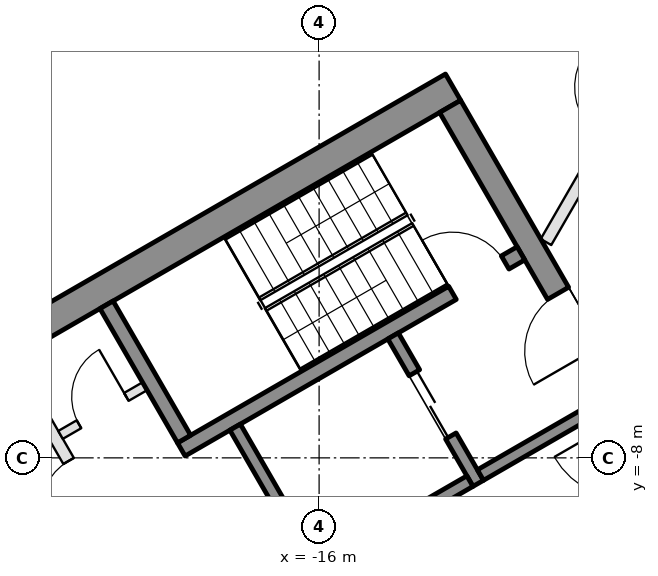
"""IFC4 building model, lengths in metres.
Left out: names, types, materials, properties, quantities, classifications, styles, units other than length and angle.
Written with IfcOpenShell. Run it as: python <this file> out.ifc"""

import sys

from ifc_helpers import new_model, si_unit, direction, frame, frame_2d, origin, place, context, subcontext, project, spatial, rectangle, extrude, element, fill, save


model = new_model("IFC4")
c1 = context("Model", 3, precision=1e-05, world=origin(), true_north=direction((0.0, 1.0)))
c2 = subcontext(c1, "Body", "Model", "MODEL_VIEW")
j1 = project(units=[si_unit("LENGTHUNIT", "METRE"), si_unit("PLANEANGLEUNIT", "RADIAN")], contexts=[c1])
p1 = place(None, origin())
s1 = spatial("IfcSite", under=j1, at=p1, CompositionType="ELEMENT")
p2 = place(p1, origin())
s2 = spatial("IfcBuilding", under=s1, at=p2, CompositionType="ELEMENT")
p3 = place(p2, frame((0.0, 0.0, 53.9)))
s3 = spatial("IfcBuildingStorey", under=s2, at=p3, CompositionType="ELEMENT", Elevation=53.9)
p4 = place(p3, frame((-20.309, 1.934, 0.0), z_axis=(0.0, 0.0, 1.0), x_axis=(-0.499992114976, -0.866029956157, 0.0)))
e1 = element("IfcWall", 1, at=p4, inside=s3, PredefinedType="SOLIDWALL", context=c2, shape_type="SweptSolid", body=[
    extrude(rectangle(XDim=6.74, YDim=0.35, at=frame_2d((3.37, 0.0))), origin(), (0.0, 0.0, 1.0), 3.55),
])
p5 = place(p4, frame((4.02, 0.0, 0.0)))
e2 = element("IfcOpeningElement", 2, at=p5, cuts=e1, PredefinedType="OPENING", context=c2, shape_type="SweptSolid", body=[
    extrude(rectangle(XDim=2.4, YDim=2.4, at=frame_2d((1.2, 1.2))), frame((0.0, 0.185, 0.0), z_axis=(0.0, -1.0, 0.0), x_axis=(1.0, 0.0, 0.0)), (0.0, 0.0, 1.0), 0.37),
])
p6 = place(p4, frame((0.32, 0.0, 0.3)))
e3 = element("IfcOpeningElement", 3, at=p6, cuts=e1, PredefinedType="OPENING", context=c2, shape_type="SweptSolid", body=[
    extrude(rectangle(XDim=1.5, YDim=2.65, at=frame_2d((0.75, 1.325))), frame((0.0, 0.185, 0.0), z_axis=(0.0, -1.0, 0.0), x_axis=(1.0, 0.0, 0.0)), (0.0, 0.0, 1.0), 0.37),
])
p7 = place(p4, frame((2.12, 0.0, 0.3)))
e4 = element("IfcOpeningElement", 4, at=p7, cuts=e1, PredefinedType="OPENING", context=c2, shape_type="SweptSolid", body=[
    extrude(rectangle(XDim=1.5, YDim=2.65, at=frame_2d((0.75, 1.325))), frame((0.0, 0.185, 0.0), z_axis=(0.0, -1.0, 0.0), x_axis=(1.0, 0.0, 0.0)), (0.0, 0.0, 1.0), 0.37),
])
p8 = place(p3, frame((-13.797, -1.903, 0.0), z_axis=(0.0, 0.0, 1.0), x_axis=(-0.866025009528, -0.500000682871, 0.0)))
e5 = element("IfcWall", 5, at=p8, inside=s3, PredefinedType="SHEAR", context=c2, shape_type="SweptSolid", body=[
    extrude(rectangle(XDim=14.837, YDim=0.5, at=frame_2d((7.418, 0.0))), origin(), (0.0, 0.0, 1.0), 3.5),
])
p9 = place(p3, frame((-13.845, -2.22, 0.0), z_axis=(0.0, 0.0, 1.0), x_axis=(0.500004234368, -0.866022959057, 0.0)))
e6 = element("IfcWall", 6, at=p9, inside=s3, PredefinedType="SHEAR", context=c2, shape_type="SweptSolid", body=[
    extrude(rectangle(XDim=10.0, YDim=0.4, at=frame_2d((5.0, 0.0))), origin(), (0.0, 0.0, 1.0), 3.5),
])
p10 = place(p9, frame((3.55, 0.0, 0.0)))
e7 = element("IfcOpeningElement", 7, at=p10, cuts=e6, PredefinedType="OPENING", context=c2, shape_type="SweptSolid", body=[
    extrude(rectangle(XDim=1.1, YDim=2.1, at=frame_2d((0.55, 1.05))), frame((0.0, 0.21, 0.0), z_axis=(0.0, -1.0, 0.0), x_axis=(1.0, 0.0, 0.0)), (0.0, 0.0, 1.0), 0.42),
])
p11 = place(p9, frame((5.85, 0.0, 0.0)))
e8 = element("IfcOpeningElement", 8, at=p11, cuts=e6, PredefinedType="OPENING", context=c2, shape_type="SweptSolid", body=[
    extrude(rectangle(XDim=1.4, YDim=2.1, at=frame_2d((0.7, 1.05))), frame((0.0, 0.21, 0.0), z_axis=(0.0, -1.0, 0.0), x_axis=(1.0, 0.0, 0.0)), (0.0, 0.0, 1.0), 0.42),
])
p12 = place(p3, frame((-12.681, -4.636, 0.0), z_axis=(0.0, 0.0, 1.0), x_axis=(-0.866021702275, -0.500006411147, 0.0)))
e9 = element("IfcWall", 9, at=p12, inside=s3, PredefinedType="SHEAR", context=c2, shape_type="SweptSolid", body=[
    extrude(rectangle(XDim=6.45, YDim=0.25, at=frame_2d((3.225, 0.0))), origin(), (0.0, 0.0, 1.0), 3.5),
])
p13 = place(p12, frame((0.3, 0.0, 0.0)))
e10 = element("IfcOpeningElement", 10, at=p13, cuts=e9, PredefinedType="OPENING", context=c2, shape_type="SweptSolid", body=[
    extrude(rectangle(XDim=1.0, YDim=2.1, at=frame_2d((0.5, 1.05))), frame((0.0, 0.135, 0.0), z_axis=(0.0, -1.0, 0.0), x_axis=(1.0, 0.0, 0.0)), (0.0, 0.0, 1.0), 0.27),
])
p14 = place(p3, frame((-19.496, -5.482, 0.0), z_axis=(0.0, 0.0, 1.0), x_axis=(0.499990435942, -0.866030925526, 0.0)))
e11 = element("IfcWall", 11, at=p14, inside=s3, PredefinedType="SHEAR", context=c2, shape_type="SweptSolid", body=[
    extrude(rectangle(XDim=2.55, YDim=0.25, at=frame_2d((1.275, 0.0))), origin(), (0.0, 0.0, 1.0), 3.5),
])
p15 = place(p3, frame((-17.381, -7.495, 0.0), z_axis=(0.0, 0.0, 1.0), x_axis=(0.500011755427, -0.866018616679, 0.0)))
e12 = element("IfcWall", 12, at=p15, inside=s3, PredefinedType="SHEAR", context=c2, shape_type="SweptSolid", body=[
    extrude(rectangle(XDim=2.8, YDim=0.2, at=frame_2d((1.4, 0.0))), origin(), (0.0, 0.0, 1.0), 3.5),
])
p16 = place(p3, frame((-14.783, -5.995, 0.0), z_axis=(0.0, 0.0, 1.0), x_axis=(0.49994636267, -0.866056369097, 0.0)))
e13 = element("IfcWall", 13, at=p16, inside=s3, PredefinedType="SHEAR", context=c2, shape_type="SweptSolid", body=[
    extrude(rectangle(XDim=2.8, YDim=0.2, at=frame_2d((1.4, 0.0))), origin(), (0.0, 0.0, 1.0), 3.5),
])
p17 = place(p16, frame((0.7, 0.0, 0.0)))
e14 = element("IfcOpeningElement", 14, at=p17, cuts=e13, PredefinedType="OPENING", context=c2, shape_type="SweptSolid", body=[
    extrude(rectangle(XDim=1.2, YDim=2.1, at=frame_2d((0.6, 1.05))), frame((0.0, 0.11, 0.0), z_axis=(0.0, -1.0, 0.0), x_axis=(1.0, 0.0, 0.0)), (0.0, 0.0, 1.0), 0.22),
])
p18 = place(p3, frame((-13.52, -8.383, 0.0), z_axis=(0.0, 0.0, 1.0), x_axis=(-0.866034573852, -0.49998411664, 0.0)))
e15 = element("IfcWall", 15, at=p18, inside=s3, PredefinedType="SHEAR", context=c2, shape_type="SweptSolid", body=[
    extrude(rectangle(XDim=2.8, YDim=0.2, at=frame_2d((1.4, 0.0))), origin(), (0.0, 0.0, 1.0), 3.5),
])
p19 = place(p3, frame((-11.268, -7.083, 0.0), z_axis=(0.0, 0.0, 1.0), x_axis=(-0.866050077142, -0.499957262057, 0.0)))
e16 = element("IfcWall", 16, at=p19, inside=s3, PredefinedType="SHEAR", context=c2, shape_type="SweptSolid", body=[
    extrude(rectangle(XDim=2.4, YDim=0.2, at=frame_2d((1.2, 0.0))), origin(), (0.0, 0.0, 1.0), 3.5),
])
p20 = place(p3, frame((-21.076, -6.395, 0.0), z_axis=(0.0, 0.0, 1.0), x_axis=(0.50001468107, -0.866016927499, 0.0)))
e17 = element("IfcWall", 17, at=p20, inside=s3, PredefinedType="PARTITIONING", context=c2, shape_type="SweptSolid", body=[
    extrude(rectangle(XDim=5.4, YDim=0.2, at=frame_2d((2.7, 0.0))), origin(), (0.0, 0.0, 1.0), 3.5),
])
p21 = place(p20, frame((1.913, 0.0, 0.0)))
e18 = element("IfcOpeningElement", 18, at=p21, cuts=e17, PredefinedType="OPENING", context=c2, shape_type="SweptSolid", body=[
    extrude(rectangle(XDim=0.9, YDim=2.1, at=frame_2d((0.45, 1.05))), frame((0.0, 0.11, 0.0), z_axis=(0.0, -1.0, 0.0), x_axis=(1.0, 0.0, 0.0)), (0.0, 0.0, 1.0), 0.22),
])
p22 = place(p20, frame((3.788, 0.0, 0.0)))
e19 = element("IfcOpeningElement", 19, at=p22, cuts=e17, PredefinedType="OPENING", context=c2, shape_type="SweptSolid", body=[
    extrude(rectangle(XDim=0.9, YDim=2.1, at=frame_2d((0.45, 1.05))), frame((0.0, 0.11, 0.0), z_axis=(0.0, -1.0, 0.0), x_axis=(1.0, 0.0, 0.0)), (0.0, 0.0, 1.0), 0.22),
])
p23 = place(p3, frame((-18.866, -6.822, 0.0), z_axis=(0.0, 0.0, 1.0), x_axis=(-0.866028054938, -0.499995408039, 0.0)))
e20 = element("IfcWall", 20, at=p23, inside=s3, PredefinedType="PARTITIONING", context=c2, shape_type="SweptSolid", body=[
    extrude(rectangle(XDim=1.6, YDim=0.15, at=frame_2d((0.8, 0.0))), origin(), (0.0, 0.0, 1.0), 3.5),
])
p24 = place(p23, frame((0.35, 0.0, 0.0)))
e21 = element("IfcOpeningElement", 21, at=p24, cuts=e20, PredefinedType="OPENING", context=c2, shape_type="SweptSolid", body=[
    extrude(rectangle(XDim=0.9, YDim=2.1, at=frame_2d((0.45, 1.05))), frame((0.0, 0.085, 0.0), z_axis=(0.0, -1.0, 0.0), x_axis=(1.0, 0.0, 0.0)), (0.0, 0.0, 1.0), 0.17),
])
p25 = place(p3, frame((-12.269, -4.45, 0.0), z_axis=(0.0, 0.0, 1.0), x_axis=(0.500021044785, 0.866013253231, 0.0)))
e22 = element("IfcWall", 22, at=p25, inside=s3, PredefinedType="PARTITIONING", context=c2, shape_type="SweptSolid", body=[
    extrude(rectangle(XDim=4.884, YDim=0.2, at=frame_2d((2.442, 0.0))), origin(), (0.0, 0.0, 1.0), 2.95),
])
p26 = place(p25, frame((1.942, 0.0, 0.0)))
e23 = element("IfcOpeningElement", 23, at=p26, cuts=e22, PredefinedType="OPENING", context=c2, shape_type="SweptSolid", body=[
    extrude(rectangle(XDim=1.0, YDim=2.1, at=frame_2d((0.5, 1.05))), frame((0.0, 0.11, 0.0), z_axis=(0.0, -1.0, 0.0), x_axis=(1.0, 0.0, 0.0)), (0.0, 0.0, 1.0), 0.22),
])
p27 = place(p17, origin())
e24 = element("IfcDoor", 24, at=p27, inside=s3, OperationType="DOUBLE_DOOR_SLIDING", PredefinedType="DOOR", context=c2, shape_type="SweptSolid", body=[
    extrude(rectangle(XDim=1.2, YDim=2.1, at=frame_2d((0.6, 1.05))), frame((0.0, 0.025, 0.0), z_axis=(0.0, -1.0, 0.0), x_axis=(1.0, 0.0, 0.0)), (0.0, 0.0, 1.0), 0.05),
])
fill(e14, e24)
p28 = place(p24, frame((0.9, 0.0, 0.0), z_axis=(0.0, 0.0, 1.0), x_axis=(-1.0, 0.0, 0.0)))
e25 = element("IfcDoor", 25, at=p28, inside=s3, OperationType="SINGLE_SWING_RIGHT", PredefinedType="DOOR", context=c2, shape_type="SweptSolid", body=[
    extrude(rectangle(XDim=0.9, YDim=2.1, at=frame_2d((0.45, 1.05))), frame((0.0, 0.025, 0.0), z_axis=(0.0, -1.0, 0.0), x_axis=(1.0, 0.0, 0.0)), (0.0, 0.0, 1.0), 0.05),
])
fill(e21, e25)
p29 = place(p21, frame((0.9, 0.0, 0.0), z_axis=(0.0, 0.0, 1.0), x_axis=(-1.0, 0.0, 0.0)))
e26 = element("IfcDoor", 26, at=p29, inside=s3, OperationType="SINGLE_SWING_LEFT", PredefinedType="DOOR", context=c2, shape_type="SweptSolid", body=[
    extrude(rectangle(XDim=0.9, YDim=2.1, at=frame_2d((0.45, 1.05))), frame((0.0, 0.025, 0.0), z_axis=(0.0, -1.0, 0.0), x_axis=(1.0, 0.0, 0.0)), (0.0, 0.0, 1.0), 0.05),
])
fill(e18, e26)
p30 = place(p10, frame((1.1, 0.0, 0.0), z_axis=(0.0, 0.0, 1.0), x_axis=(-1.0, 0.0, 0.0)))
e27 = element("IfcDoor", 27, at=p30, inside=s3, OperationType="SINGLE_SWING_LEFT", PredefinedType="DOOR", context=c2, shape_type="SweptSolid", body=[
    extrude(rectangle(XDim=1.1, YDim=2.1, at=frame_2d((0.55, 1.05))), frame((0.0, 0.025, 0.0), z_axis=(0.0, -1.0, 0.0), x_axis=(1.0, 0.0, 0.0)), (0.0, 0.0, 1.0), 0.05),
])
fill(e7, e27)
p31 = place(p13, frame((1.0, 0.0, 0.0), z_axis=(0.0, 0.0, 1.0), x_axis=(-1.0, 0.0, 0.0)))
e28 = element("IfcDoor", 28, at=p31, inside=s3, OperationType="SINGLE_SWING_LEFT", PredefinedType="DOOR", context=c2, shape_type="SweptSolid", body=[
    extrude(rectangle(XDim=1.0, YDim=2.1, at=frame_2d((0.5, 1.05))), frame((0.0, 0.025, 0.0), z_axis=(0.0, -1.0, 0.0), x_axis=(1.0, 0.0, 0.0)), (0.0, 0.0, 1.0), 0.05),
])
fill(e10, e28)
save(model, sys.argv[1])
